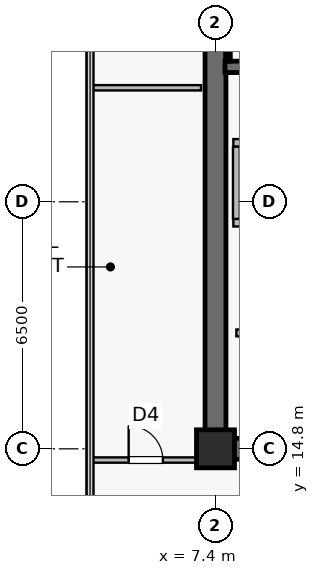
"""IFC4 building model, lengths in metres.
Left out: names, types, materials, properties, quantities, classifications, styles, units other than length and angle.
Written with IfcOpenShell. Run it as: python <this file> out.ifc"""

import sys

from ifc_helpers import new_model, si_unit, direction, frame, frame_2d, origin, origin_2d, place, context, subcontext, project, spatial, rectangle, extrude, source, transform, mapped, element, fill, save


model = new_model("IFC4")
c1 = context("Model", 3, precision=1e-05, world=origin(), true_north=direction((0.0, 1.0)))
c2 = subcontext(c1, "Body", "Model", "MODEL_VIEW")
j1 = project(units=[si_unit("LENGTHUNIT", "METRE"), si_unit("PLANEANGLEUNIT", "RADIAN")], contexts=[c1])
p1 = place(None, origin())
s1 = spatial("IfcSite", under=j1, at=p1, CompositionType="ELEMENT")
p2 = place(p1, origin())
s2 = spatial("IfcBuilding", under=s1, at=p2, CompositionType="ELEMENT")
p3 = place(p2, frame((0.0, 0.0, 242.4)))
s3 = spatial("IfcBuildingStorey", under=s2, at=p3, CompositionType="ELEMENT", Elevation=242.4)
p4 = place(p3, frame((7.125, 14.8, 0.0), z_axis=(0.0, 0.0, 1.0), x_axis=(1.0, 0.0, 0.0)))
e1 = element("IfcWall", 1, at=p4, inside=s3, PredefinedType="SHEAR", context=c2, shape_type="SweptSolid", body=[
    extrude(rectangle(XDim=15.35, YDim=0.55, at=frame_2d((7.675, 0.0))), origin(), (0.0, 0.0, 1.0), 3.8),
])
p5 = place(p3, frame((7.4, 15.075, 0.0), z_axis=(0.0, 0.0, 1.0), x_axis=(0.0, 1.0, 0.0)))
e2 = element("IfcWall", 2, at=p5, inside=s3, PredefinedType="SHEAR", context=c2, shape_type="SweptSolid", body=[
    extrude(rectangle(XDim=18.45, YDim=0.55, at=frame_2d((9.225, 0.0))), origin(), (0.0, 0.0, 1.0), 3.8),
])
p6 = place(p3, frame((7.65, 24.85, 0.0), z_axis=(0.0, 0.0, 1.0), x_axis=(1.0, 0.0, 0.0)))
e3 = element("IfcWall", 3, at=p6, inside=s3, PredefinedType="SHEAR", context=c2, shape_type="SweptSolid", body=[
    extrude(rectangle(XDim=3.8, YDim=0.3, at=frame_2d((1.9, 0.0))), origin(), (0.0, 0.0, 1.0), 3.8),
])
p7 = place(p3, frame((7.73, 25.0, 0.0), z_axis=(0.0, 0.0, 1.0), x_axis=(0.0, 1.0, 0.0)))
e4 = element("IfcWall", 4, at=p7, inside=s3, PredefinedType="SOLIDWALL", context=c2, shape_type="SweptSolid", body=[
    extrude(rectangle(XDim=8.32, YDim=0.12, at=frame_2d((4.16, 0.0))), origin(), (0.0, 0.0, 1.0), 3.8),
])
m1 = source(origin(), c2, "Body", "SweptSolid", [
    extrude(rectangle(XDim=1.0, YDim=1.0, at=origin_2d()), origin(), (0.0, 0.0, 1.0), 4.1),
])
p8 = place(p3, frame((7.4, 14.8, 0.0), z_axis=(0.0, 0.0, 1.0), x_axis=(1.0, 0.0, 0.0)))
e5 = element("IfcColumn", 5, at=p8, inside=s3, PredefinedType="COLUMN", context=c2, shape_type="MappedRepresentation", body=[
    mapped(m1, transform((0.0, 0.0, 0.0), scale=1.0)),
])
p9 = place(p3, frame((7.87, 20.75, 0.0), z_axis=(0.0, 0.0, 1.0), x_axis=(1.0, 0.0, 0.0)))
e6 = element("IfcWall", 6, at=p9, inside=s3, PredefinedType="SOLIDWALL", context=c2, shape_type="SweptSolid", body=[
    extrude(rectangle(XDim=2.26, YDim=0.2, at=frame_2d((1.13, 0.0))), origin(), (0.0, 0.0, 1.0), 3.8),
])
p10 = place(p9, frame((0.58, 0.0, 0.0)))
e7 = element("IfcOpeningElement", 7, at=p10, cuts=e6, PredefinedType="OPENING", context=c2, shape_type="SweptSolid", body=[
    extrude(rectangle(XDim=1.1, YDim=2.22, at=frame_2d((0.55, 1.11))), frame((0.0, 0.11, 0.0), z_axis=(0.0, -1.0, 0.0), x_axis=(1.0, 0.0, 0.0)), (0.0, 0.0, 1.0), 0.22),
])
p11 = place(p3, frame((7.87, 22.85, 0.0), z_axis=(0.0, 0.0, 1.0), x_axis=(1.0, 0.0, 0.0)))
e8 = element("IfcWall", 8, at=p11, inside=s3, PredefinedType="SOLIDWALL", context=c2, shape_type="SweptSolid", body=[
    extrude(rectangle(XDim=2.26, YDim=0.2, at=frame_2d((1.13, 0.0))), origin(), (0.0, 0.0, 1.0), 3.8),
])
p12 = place(p3, frame((7.95, 20.85, 0.0), z_axis=(0.0, 0.0, 1.0), x_axis=(0.0, 1.0, 0.0)))
e9 = element("IfcWall", 9, at=p12, inside=s3, PredefinedType="SOLIDWALL", context=c2, shape_type="SweptSolid", body=[
    extrude(rectangle(XDim=1.9, YDim=0.18, at=frame_2d((0.95, 0.0))), origin(), (0.0, 0.0, 1.0), 3.8),
])
p13 = place(p3, frame((7.95, 17.85, 0.0), z_axis=(0.0, 0.0, 1.0), x_axis=(1.0, 0.0, 0.0)))
e10 = element("IfcWall", 10, at=p13, inside=s3, PredefinedType="SOLIDWALL", context=c2, shape_type="SweptSolid", body=[
    extrude(rectangle(XDim=3.25, YDim=0.18, at=frame_2d((1.625, 0.0))), origin(), (0.0, 0.0, 1.0), 3.8),
])
p14 = place(p13, frame((1.15, 0.0, 0.0)))
e11 = element("IfcOpeningElement", 11, at=p14, cuts=e10, PredefinedType="OPENING", context=c2, shape_type="SweptSolid", body=[
    extrude(rectangle(XDim=0.95, YDim=2.15, at=frame_2d((0.475, 1.075))), frame((0.0, 0.1, 0.0), z_axis=(0.0, -1.0, 0.0), x_axis=(1.0, 0.0, 0.0)), (0.0, 0.0, 1.0), 0.2),
])
p15 = place(p3, frame((4.11, 24.3, 0.0), z_axis=(0.0, 0.0, 1.0), x_axis=(1.0, 0.0, 0.0)))
e12 = element("IfcWall", 12, at=p15, inside=s3, PredefinedType="PARTITIONING", context=c2, shape_type="SweptSolid", body=[
    extrude(rectangle(XDim=2.91, YDim=0.14, at=frame_2d((1.455, 0.0))), origin(), (0.0, 0.0, 1.0), 3.8),
])
p16 = place(p3, frame((4.11, 14.505, 0.0), z_axis=(0.0, 0.0, 1.0), x_axis=(1.0, 0.0, 0.0)))
e13 = element("IfcWall", 13, at=p16, inside=s3, PredefinedType="PARTITIONING", context=c2, shape_type="SweptSolid", body=[
    extrude(rectangle(XDim=2.91, YDim=0.14, at=frame_2d((1.455, 0.0))), origin(), (0.0, 0.0, 1.0), 3.8),
])
p17 = place(p16, frame((1.005, 0.0, 0.0)))
e14 = element("IfcOpeningElement", 14, at=p17, cuts=e13, PredefinedType="OPENING", context=c2, shape_type="SweptSolid", body=[
    extrude(rectangle(XDim=0.9, YDim=2.1, at=frame_2d((0.45, 1.05))), frame((0.0, 0.08, 0.0), z_axis=(0.0, -1.0, 0.0), x_axis=(1.0, 0.0, 0.0)), (0.0, 0.0, 1.0), 0.16),
])
m2 = source(origin(), c2, "Body", "SweptSolid", [
    extrude(rectangle(XDim=0.9, YDim=2.1, at=frame_2d((0.45, 1.05))), frame((0.0, 0.025, 0.0), z_axis=(0.0, -1.0, 0.0), x_axis=(1.0, 0.0, 0.0)), (0.0, 0.0, 1.0), 0.05),
])
p18 = place(p17, origin())
e15 = element("IfcDoor", 15, at=p18, inside=s3, OperationType="SINGLE_SWING_LEFT", PredefinedType="DOOR", context=c2, shape_type="MappedRepresentation", body=[
    mapped(m2, transform((0.0, 0.0, 0.0), scale=1.0)),
])
fill(e14, e15)
save(model, sys.argv[1])
